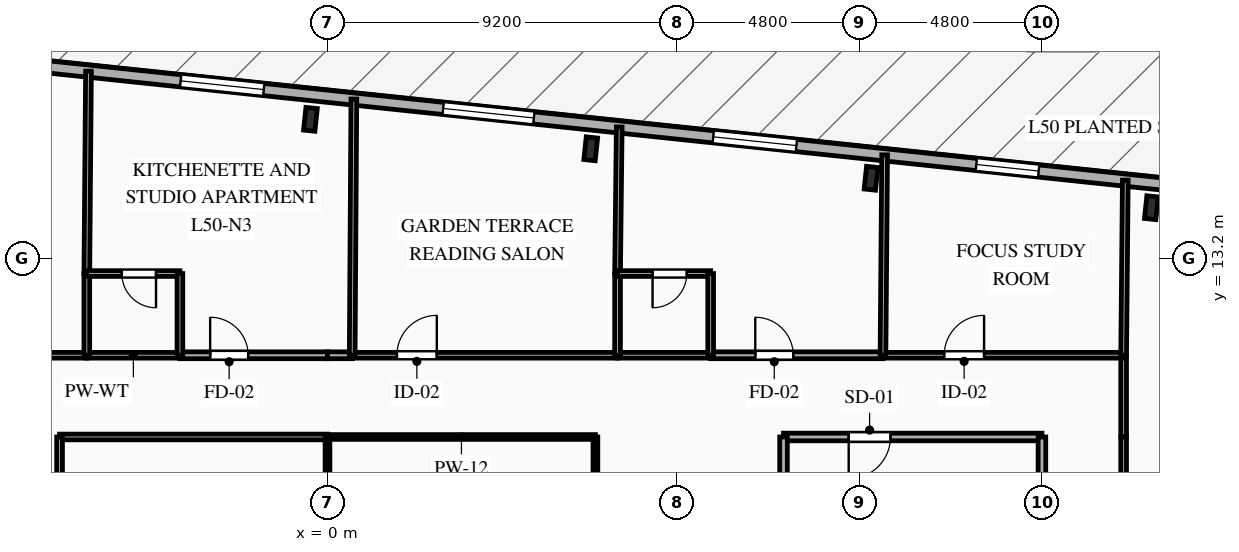
"""IFC4 building model, lengths in metres.
Left out: names, types, materials, properties, quantities, classifications, styles, units other than length and angle.
Written with IfcOpenShell. Run it as: python <this file> out.ifc"""

import sys

from ifc_helpers import new_model, si_unit, direction, frame, frame_2d, origin, origin_2d, place, context, subcontext, project, spatial, rectangle, i_section, extrude, element, fill, save


model = new_model("IFC4")
c1 = context("Model", 3, precision=1e-05, world=origin(), true_north=direction((0.0, 1.0)))
c2 = subcontext(c1, "Body", "Model", "MODEL_VIEW")
j1 = project(units=[si_unit("LENGTHUNIT", "METRE"), si_unit("PLANEANGLEUNIT", "RADIAN")], contexts=[c1])
p1 = place(None, origin())
s1 = spatial("IfcSite", under=j1, at=p1, CompositionType="ELEMENT")
p2 = place(p1, origin())
s2 = spatial("IfcBuilding", under=s1, at=p2, CompositionType="ELEMENT")
p3 = place(p2, frame((0.0, 0.0, 179.65)))
s3 = spatial("IfcBuildingStorey", under=s2, at=p3, CompositionType="ELEMENT", Elevation=179.65)
for number, where, z_axis, x_axis in (
    (1, (21.679, 14.532, 0.0), (0.0, 0.0, 1.0), (0.995, -0.105, 0.0)),
    (2, (14.303, 15.308, 0.0), (0.0, 0.0, 1.0), (0.995, -0.105, 0.0)),
    (3, (6.927, 16.083, 0.0), (0.0, 0.0, 1.0), (0.995, -0.105, 0.0)),
    (4, (-0.449, 16.858, 0.0), (0.0, 0.0, 1.0), (0.995, -0.105, 0.0)),
):
    element("IfcColumn", number, at=place(p3, frame(where, z_axis=z_axis, x_axis=x_axis)), inside=s3, PredefinedType="COLUMN", context=c2, shape_type="SweptSolid", body=[
        extrude(i_section(OverallWidth=0.3, OverallDepth=0.6, WebThickness=0.015, FlangeThickness=0.03, FilletRadius=0.027, at=origin_2d()), origin(), (0.0, 0.0, 1.0), 3.35),
    ])
p4 = place(p3, frame((-23.156, 19.898, 0.0), z_axis=(0.0, 0.0, 1.0), x_axis=(0.994522001802, -0.104527450613, 0.0)))
e5 = element("IfcWall", 5, at=p4, inside=s3, PredefinedType="SOLIDWALL", context=c2, shape_type="SweptSolid", body=[
    extrude(rectangle(XDim=45.8, YDim=0.32, at=frame_2d((22.9, 0.0))), origin(), (0.0, 0.0, 1.0), 3.04),
])
p5 = place(p4, frame((10.65, 0.0, 0.0)))
e6 = element("IfcOpeningElement", 6, at=p5, cuts=e5, PredefinedType="OPENING", context=c2, shape_type="SweptSolid", body=[
    extrude(rectangle(XDim=1.2, YDim=2.2, at=frame_2d((0.6, 1.1))), frame((0.0, 0.17, 0.0), z_axis=(0.0, -1.0, 0.0), x_axis=(1.0, 0.0, 0.0)), (0.0, 0.0, 1.0), 0.34),
])
p6 = place(p4, frame((5.34, 0.0, 0.85)))
e7 = element("IfcOpeningElement", 7, at=p6, cuts=e5, PredefinedType="OPENING", context=c2, shape_type="SweptSolid", body=[
    extrude(rectangle(XDim=1.65, YDim=1.85, at=frame_2d((0.825, 0.925))), frame((0.0, 0.17, 0.0), z_axis=(0.0, -1.0, 0.0), x_axis=(1.0, 0.0, 0.0)), (0.0, 0.0, 1.0), 0.34),
])
p7 = place(p4, frame((12.842, 0.0, 0.85)))
e8 = element("IfcOpeningElement", 8, at=p7, cuts=e5, PredefinedType="OPENING", context=c2, shape_type="SweptSolid", body=[
    extrude(rectangle(XDim=2.4, YDim=1.95, at=frame_2d((1.2, 0.975))), frame((0.0, 0.17, 0.0), z_axis=(0.0, -1.0, 0.0), x_axis=(1.0, 0.0, 0.0)), (0.0, 0.0, 1.0), 0.34),
])
p8 = place(p4, frame((19.398, 0.0, 0.85)))
e9 = element("IfcOpeningElement", 9, at=p8, cuts=e5, PredefinedType="OPENING", context=c2, shape_type="SweptSolid", body=[
    extrude(rectangle(XDim=2.2, YDim=1.85, at=frame_2d((1.1, 0.925))), frame((0.0, 0.17, 0.0), z_axis=(0.0, -1.0, 0.0), x_axis=(1.0, 0.0, 0.0)), (0.0, 0.0, 1.0), 0.34),
])
p9 = place(p4, frame((26.344, 0.0, 0.85)))
e10 = element("IfcOpeningElement", 10, at=p9, cuts=e5, PredefinedType="OPENING", context=c2, shape_type="SweptSolid", body=[
    extrude(rectangle(XDim=2.4, YDim=1.95, at=frame_2d((1.2, 0.975))), frame((0.0, 0.17, 0.0), z_axis=(0.0, -1.0, 0.0), x_axis=(1.0, 0.0, 0.0)), (0.0, 0.0, 1.0), 0.34),
])
p10 = place(p4, frame((33.49, 0.0, 0.85)))
e11 = element("IfcOpeningElement", 11, at=p10, cuts=e5, PredefinedType="OPENING", context=c2, shape_type="SweptSolid", body=[
    extrude(rectangle(XDim=2.2, YDim=1.85, at=frame_2d((1.1, 0.925))), frame((0.0, 0.17, 0.0), z_axis=(0.0, -1.0, 0.0), x_axis=(1.0, 0.0, 0.0)), (0.0, 0.0, 1.0), 0.34),
])
p11 = place(p4, frame((40.451, 0.0, 0.85)))
e12 = element("IfcOpeningElement", 12, at=p11, cuts=e5, PredefinedType="OPENING", context=c2, shape_type="SweptSolid", body=[
    extrude(rectangle(XDim=1.65, YDim=1.85, at=frame_2d((0.825, 0.925))), frame((0.0, 0.17, 0.0), z_axis=(0.0, -1.0, 0.0), x_axis=(1.0, 0.0, 0.0)), (0.0, 0.0, 1.0), 0.34),
])
p12 = place(p3, frame((18.8, 8.5, 0.0), z_axis=(0.0, 0.0, 1.0), x_axis=(-1.0, 0.0, 0.0)))
e13 = element("IfcWall", 13, at=p12, inside=s3, PredefinedType="PARTITIONING", context=c2, shape_type="SweptSolid", body=[
    extrude(rectangle(XDim=6.8, YDim=0.2, at=frame_2d((3.4, 0.0))), origin(), (0.0, 0.0, 1.0), 3.04),
])
p13 = place(p12, frame((3.985, 0.0, 0.0)))
e14 = element("IfcOpeningElement", 14, at=p13, cuts=e13, PredefinedType="OPENING", context=c2, shape_type="SweptSolid", body=[
    extrude(rectangle(XDim=1.1, YDim=2.15, at=frame_2d((0.55, 1.075))), frame((0.0, 0.11, 0.0), z_axis=(0.0, -1.0, 0.0), x_axis=(1.0, 0.0, 0.0)), (0.0, 0.0, 1.0), 0.22),
])
p14 = place(p3, frame((18.8, 5.6, 0.0), z_axis=(0.0, 0.0, 1.0), x_axis=(0.0, 1.0, 0.0)))
e15 = element("IfcWall", 15, at=p14, inside=s3, PredefinedType="PARTITIONING", context=c2, shape_type="SweptSolid", body=[
    extrude(rectangle(XDim=2.9, YDim=0.2, at=frame_2d((1.45, 0.0))), origin(), (0.0, 0.0, 1.0), 2.665),
])
p15 = place(p3, frame((12.0, 8.5, 0.0), z_axis=(0.0, 0.0, 1.0), x_axis=(0.0, -1.0, 0.0)))
e16 = element("IfcWall", 16, at=p15, inside=s3, PredefinedType="PARTITIONING", context=c2, shape_type="SweptSolid", body=[
    extrude(rectangle(XDim=2.9, YDim=0.2, at=frame_2d((1.45, 0.0))), origin(), (0.0, 0.0, 1.0), 3.04),
])
p16 = place(p3, frame((-13.317, 10.65, 0.0), z_axis=(0.0, 0.0, 1.0), x_axis=(1.0, 0.0, 0.0)))
e17 = element("IfcWall", 17, at=p16, inside=s3, PredefinedType="PARTITIONING", context=c2, shape_type="SweptSolid", body=[
    extrude(rectangle(XDim=6.984, YDim=0.15, at=frame_2d((3.492, 0.0))), origin(), (0.0, 0.0, 1.0), 3.04),
])
p17 = place(p16, frame((1.177, 0.0, 0.0)))
e18 = element("IfcOpeningElement", 18, at=p17, cuts=e17, PredefinedType="OPENING", context=c2, shape_type="SweptSolid", body=[
    extrude(rectangle(XDim=1.05, YDim=2.15, at=frame_2d((0.525, 1.075))), frame((0.0, 0.085, 0.0), z_axis=(0.0, -1.0, 0.0), x_axis=(1.0, 0.0, 0.0)), (0.0, 0.0, 1.0), 0.17),
])
p18 = place(p3, frame((-3.883, 10.65, 0.0), z_axis=(0.0, 0.0, 1.0), x_axis=(1.0, 0.0, 0.0)))
e19 = element("IfcWall", 19, at=p18, inside=s3, PredefinedType="PARTITIONING", context=c2, shape_type="SweptSolid", body=[
    extrude(rectangle(XDim=3.883, YDim=0.18, at=frame_2d((1.941, 0.0))), origin(), (0.0, 0.0, 1.0), 3.04),
])
p19 = place(p18, frame((0.795, 0.0, 0.0)))
e20 = element("IfcOpeningElement", 20, at=p19, cuts=e19, PredefinedType="OPENING", context=c2, shape_type="SweptSolid", body=[
    extrude(rectangle(XDim=1.0, YDim=2.15, at=frame_2d((0.5, 1.075))), frame((0.0, 0.1, 0.0), z_axis=(0.0, -1.0, 0.0), x_axis=(1.0, 0.0, 0.0)), (0.0, 0.0, 1.0), 0.2),
])
p20 = place(p3, frame((-6.333, 10.65, 0.0), z_axis=(0.0, 0.0, 1.0), x_axis=(1.0, 0.0, 0.0)))
e21 = element("IfcWall", 21, at=p20, inside=s3, PredefinedType="PLUMBINGWALL", context=c2, shape_type="SweptSolid", body=[
    extrude(rectangle(XDim=2.45, YDim=0.15, at=frame_2d((1.225, 0.0))), origin(), (0.0, 0.0, 1.0), 3.04),
])
p21 = place(p3, frame((0.0, 8.5, 0.0), z_axis=(0.0, 0.0, 1.0), x_axis=(-1.0, 0.0, 0.0)))
e22 = element("IfcWall", 22, at=p21, inside=s3, PredefinedType="PARTITIONING", context=c2, shape_type="SweptSolid", body=[
    extrude(rectangle(XDim=7.05, YDim=0.15, at=frame_2d((3.525, 0.0))), origin(), (0.0, 0.0, 1.0), 3.04),
])
p22 = place(p3, frame((20.95, 10.65, 0.0), z_axis=(0.0, 0.0, 1.0), x_axis=(0.0, -1.0, 0.0)))
e23 = element("IfcWall", 23, at=p22, inside=s3, PredefinedType="PARTITIONING", context=c2, shape_type="SweptSolid", body=[
    extrude(rectangle(XDim=2.15, YDim=0.15, at=frame_2d((1.075, 0.0))), origin(), (0.0, 0.0, 1.0), 3.04),
])
p23 = place(p3, frame((0.0, 10.65, 0.0), z_axis=(0.0, 0.0, 1.0), x_axis=(1.0, 0.0, 0.0)))
e24 = element("IfcWall", 24, at=p23, inside=s3, PredefinedType="PARTITIONING", context=c2, shape_type="SweptSolid", body=[
    extrude(rectangle(XDim=0.65, YDim=0.18, at=frame_2d((0.325, 0.0))), origin(), (0.0, 0.0, 1.0), 3.04),
])
p24 = place(p3, frame((0.65, 10.65, 0.0), z_axis=(0.0, 0.0, 1.0), x_axis=(1.0, 0.0, 0.0)))
e25 = element("IfcWall", 25, at=p24, inside=s3, PredefinedType="PARTITIONING", context=c2, shape_type="SweptSolid", body=[
    extrude(rectangle(XDim=6.983, YDim=0.15, at=frame_2d((3.492, 0.0))), origin(), (0.0, 0.0, 1.0), 3.04),
])
p25 = place(p24, frame((1.177, 0.0, 0.0)))
e26 = element("IfcOpeningElement", 26, at=p25, cuts=e25, PredefinedType="OPENING", context=c2, shape_type="SweptSolid", body=[
    extrude(rectangle(XDim=1.05, YDim=2.15, at=frame_2d((0.525, 1.075))), frame((0.0, 0.085, 0.0), z_axis=(0.0, -1.0, 0.0), x_axis=(1.0, 0.0, 0.0)), (0.0, 0.0, 1.0), 0.17),
])
p26 = place(p3, frame((10.083, 10.65, 0.0), z_axis=(0.0, 0.0, 1.0), x_axis=(1.0, 0.0, 0.0)))
e27 = element("IfcWall", 27, at=p26, inside=s3, PredefinedType="PARTITIONING", context=c2, shape_type="SweptSolid", body=[
    extrude(rectangle(XDim=4.534, YDim=0.18, at=frame_2d((2.267, 0.0))), origin(), (0.0, 0.0, 1.0), 3.04),
])
p27 = place(p26, frame((1.174, 0.0, 0.0)))
e28 = element("IfcOpeningElement", 28, at=p27, cuts=e27, PredefinedType="OPENING", context=c2, shape_type="SweptSolid", body=[
    extrude(rectangle(XDim=1.0, YDim=2.15, at=frame_2d((0.5, 1.075))), frame((0.0, 0.1, 0.0), z_axis=(0.0, -1.0, 0.0), x_axis=(1.0, 0.0, 0.0)), (0.0, 0.0, 1.0), 0.2),
])
p28 = place(p3, frame((7.633, 10.65, 0.0), z_axis=(0.0, 0.0, 1.0), x_axis=(1.0, 0.0, 0.0)))
e29 = element("IfcWall", 29, at=p28, inside=s3, PredefinedType="PLUMBINGWALL", context=c2, shape_type="SweptSolid", body=[
    extrude(rectangle(XDim=2.45, YDim=0.15, at=frame_2d((1.225, 0.0))), origin(), (0.0, 0.0, 1.0), 3.04),
])
p29 = place(p3, frame((14.617, 10.65, 0.0), z_axis=(0.0, 0.0, 1.0), x_axis=(1.0, 0.0, 0.0)))
e30 = element("IfcWall", 30, at=p29, inside=s3, PredefinedType="PARTITIONING", context=c2, shape_type="SweptSolid", body=[
    extrude(rectangle(XDim=6.333, YDim=0.15, at=frame_2d((3.167, 0.0))), origin(), (0.0, 0.0, 1.0), 3.04),
])
p30 = place(p29, frame((1.611, 0.0, 0.0)))
e31 = element("IfcOpeningElement", 31, at=p30, cuts=e30, PredefinedType="OPENING", context=c2, shape_type="SweptSolid", body=[
    extrude(rectangle(XDim=1.05, YDim=2.15, at=frame_2d((0.525, 1.075))), frame((0.0, 0.085, 0.0), z_axis=(0.0, -1.0, 0.0), x_axis=(1.0, 0.0, 0.0)), (0.0, 0.0, 1.0), 0.17),
])
p31 = place(p3, frame((7.05, 8.5, 0.0), z_axis=(0.0, 0.0, 1.0), x_axis=(-1.0, 0.0, 0.0)))
e32 = element("IfcWall", 32, at=p31, inside=s3, PredefinedType="PARTITIONING", context=c2, shape_type="SweptSolid", body=[
    extrude(rectangle(XDim=7.05, YDim=0.125, at=frame_2d((3.525, 0.0))), origin(), (0.0, 0.0, 1.0), 3.04),
])
p32 = place(p3, frame((20.95, 8.5, 0.0), z_axis=(0.0, 0.0, 1.0), x_axis=(0.0, -1.0, 0.0)))
e33 = element("IfcWall", 33, at=p32, inside=s3, PredefinedType="PARTITIONING", context=c2, shape_type="SweptSolid", body=[
    extrude(rectangle(XDim=9.263, YDim=0.15, at=frame_2d((4.632, 0.0))), origin(), (0.0, 0.0, 1.0), 2.695),
])
p33 = place(p32, frame((6.751, 0.0, 0.0)))
e34 = element("IfcOpeningElement", 34, at=p33, cuts=e33, PredefinedType="OPENING", context=c2, shape_type="SweptSolid", body=[
    extrude(rectangle(XDim=1.05, YDim=2.15, at=frame_2d((0.525, 1.075))), frame((0.0, 0.085, 0.0), z_axis=(0.0, -1.0, 0.0), x_axis=(1.0, 0.0, 0.0)), (0.0, 0.0, 1.0), 0.17),
])
p34 = place(p3, frame((-7.05, 8.5, 0.0), z_axis=(0.0, 0.0, 1.0), x_axis=(0.0, -1.0, 0.0)))
e35 = element("IfcWall", 35, at=p34, inside=s3, PredefinedType="PARTITIONING", context=c2, shape_type="SweptSolid", body=[
    extrude(rectangle(XDim=9.3, YDim=0.15, at=frame_2d((4.65, 0.0))), origin(), (0.0, 0.0, 1.0), 3.04),
])
p35 = place(p34, frame((6.784, 0.0, 0.0)))
e36 = element("IfcOpeningElement", 36, at=p35, cuts=e35, PredefinedType="OPENING", context=c2, shape_type="SweptSolid", body=[
    extrude(rectangle(XDim=1.05, YDim=2.15, at=frame_2d((0.525, 1.075))), frame((0.0, 0.085, 0.0), z_axis=(0.0, -1.0, 0.0), x_axis=(1.0, 0.0, 0.0)), (0.0, 0.0, 1.0), 0.17),
])
p36 = place(p3, frame((7.05, -0.8, 0.0), z_axis=(0.0, 0.0, 1.0), x_axis=(0.0, 1.0, 0.0)))
e37 = element("IfcWall", 37, at=p36, inside=s3, PredefinedType="PARTITIONING", context=c2, shape_type="SweptSolid", body=[
    extrude(rectangle(XDim=9.3, YDim=0.125, at=frame_2d((4.65, 0.0))), origin(), (0.0, 0.0, 1.0), 3.04),
])
p37 = place(p36, frame((1.479, 0.0, 0.0)))
e38 = element("IfcOpeningElement", 38, at=p37, cuts=e37, PredefinedType="OPENING", context=c2, shape_type="SweptSolid", body=[
    extrude(rectangle(XDim=0.95, YDim=2.1, at=frame_2d((0.475, 1.05))), frame((0.0, 0.073, 0.0), z_axis=(0.0, -1.0, 0.0), x_axis=(1.0, 0.0, 0.0)), (0.0, 0.0, 1.0), 0.145),
])
p38 = place(p3, frame((20.95, 10.65, 0.0), z_axis=(0.0, 0.0, 1.0), x_axis=(0.009535990233, 0.999954531411, 0.0)))
e39 = element("IfcWall", 39, at=p38, inside=s3, PredefinedType="PARTITIONING", context=c2, shape_type="SweptSolid", body=[
    extrude(rectangle(XDim=4.608, YDim=0.15, at=frame_2d((2.304, 0.0))), origin(), (0.0, 0.0, 1.0), 2.665),
])
p39 = place(p3, frame((-6.289, 18.125, 0.0), z_axis=(0.0, 0.0, 1.0), x_axis=(-0.008251678897, -0.999965954318, 0.0)))
e40 = element("IfcWall", 40, at=p39, inside=s3, PredefinedType="PARTITIONING", context=c2, shape_type="SweptSolid", body=[
    extrude(rectangle(XDim=5.326, YDim=0.15, at=frame_2d((2.663, 0.0))), origin(), (0.0, 0.0, 1.0), 3.04),
])
p40 = place(p3, frame((-6.333, 12.8, 0.0), z_axis=(0.0, 0.0, 1.0), x_axis=(0.0, -1.0, 0.0)))
e41 = element("IfcWall", 41, at=p40, inside=s3, PredefinedType="PLUMBINGWALL", context=c2, shape_type="SweptSolid", body=[
    extrude(rectangle(XDim=2.15, YDim=0.15, at=frame_2d((1.075, 0.0))), origin(), (0.0, 0.0, 1.0), 3.04),
])
p41 = place(p3, frame((-3.883, 12.8, 0.0), z_axis=(0.0, 0.0, 1.0), x_axis=(-1.0, 0.0, 0.0)))
e42 = element("IfcWall", 42, at=p41, inside=s3, PredefinedType="PLUMBINGWALL", context=c2, shape_type="SweptSolid", body=[
    extrude(rectangle(XDim=2.45, YDim=0.15, at=frame_2d((1.225, 0.0))), origin(), (0.0, 0.0, 1.0), 3.04),
])
p42 = place(p41, frame((0.629, 0.0, 0.0)))
e43 = element("IfcOpeningElement", 43, at=p42, cuts=e42, PredefinedType="OPENING", context=c2, shape_type="SweptSolid", body=[
    extrude(rectangle(XDim=0.9, YDim=2.1, at=frame_2d((0.45, 1.05))), frame((0.0, 0.085, 0.0), z_axis=(0.0, -1.0, 0.0), x_axis=(1.0, 0.0, 0.0)), (0.0, 0.0, 1.0), 0.17),
])
p43 = place(p3, frame((-3.883, 10.65, 0.0), z_axis=(0.0, 0.0, 1.0), x_axis=(0.0, 1.0, 0.0)))
e44 = element("IfcWall", 44, at=p43, inside=s3, PredefinedType="PLUMBINGWALL", context=c2, shape_type="SweptSolid", body=[
    extrude(rectangle(XDim=2.15, YDim=0.15, at=frame_2d((1.075, 0.0))), origin(), (0.0, 0.0, 1.0), 3.04),
])
p44 = place(p3, frame((0.694, 17.392, 0.0), z_axis=(0.0, 0.0, 1.0), x_axis=(-0.0065182942, -0.999978755695, 0.0)))
e45 = element("IfcWall", 45, at=p44, inside=s3, PredefinedType="PARTITIONING", context=c2, shape_type="SweptSolid", body=[
    extrude(rectangle(XDim=6.742, YDim=0.15, at=frame_2d((3.371, 0.0))), origin(), (0.0, 0.0, 1.0), 3.04),
])
p45 = place(p3, frame((7.677, 16.658, 0.0), z_axis=(0.0, 0.0, 1.0), x_axis=(-0.01139094499, -0.999935121081, 0.0)))
e46 = element("IfcWall", 46, at=p45, inside=s3, PredefinedType="PARTITIONING", context=c2, shape_type="SweptSolid", body=[
    extrude(rectangle(XDim=3.858, YDim=0.15, at=frame_2d((1.929, 0.0))), origin(), (0.0, 0.0, 1.0), 2.665),
])
p46 = place(p3, frame((7.633, 12.8, 0.0), z_axis=(0.0, 0.0, 1.0), x_axis=(0.0, -1.0, 0.0)))
e47 = element("IfcWall", 47, at=p46, inside=s3, PredefinedType="PLUMBINGWALL", context=c2, shape_type="SweptSolid", body=[
    extrude(rectangle(XDim=2.15, YDim=0.15, at=frame_2d((1.075, 0.0))), origin(), (0.0, 0.0, 1.0), 2.665),
])
p47 = place(p3, frame((10.083, 12.8, 0.0), z_axis=(0.0, 0.0, 1.0), x_axis=(-1.0, 0.0, 0.0)))
e48 = element("IfcWall", 48, at=p47, inside=s3, PredefinedType="PLUMBINGWALL", context=c2, shape_type="SweptSolid", body=[
    extrude(rectangle(XDim=2.45, YDim=0.15, at=frame_2d((1.225, 0.0))), origin(), (0.0, 0.0, 1.0), 3.04),
])
p48 = place(p47, frame((0.629, 0.0, 0.0)))
e49 = element("IfcOpeningElement", 49, at=p48, cuts=e48, PredefinedType="OPENING", context=c2, shape_type="SweptSolid", body=[
    extrude(rectangle(XDim=0.9, YDim=2.1, at=frame_2d((0.45, 1.05))), frame((0.0, 0.085, 0.0), z_axis=(0.0, -1.0, 0.0), x_axis=(1.0, 0.0, 0.0)), (0.0, 0.0, 1.0), 0.17),
])
p49 = place(p3, frame((10.083, 10.65, 0.0), z_axis=(0.0, 0.0, 1.0), x_axis=(0.0, 1.0, 0.0)))
e50 = element("IfcWall", 50, at=p49, inside=s3, PredefinedType="PLUMBINGWALL", context=c2, shape_type="SweptSolid", body=[
    extrude(rectangle(XDim=2.15, YDim=0.15, at=frame_2d((1.075, 0.0))), origin(), (0.0, 0.0, 1.0), 3.04),
])
p50 = place(p3, frame((14.661, 15.924, 0.0), z_axis=(0.0, 0.0, 1.0), x_axis=(-0.008332658252, -0.999965282801, 0.0)))
e51 = element("IfcWall", 51, at=p50, inside=s3, PredefinedType="PARTITIONING", context=c2, shape_type="SweptSolid", body=[
    extrude(rectangle(XDim=5.274, YDim=0.15, at=frame_2d((2.637, 0.0))), origin(), (0.0, 0.0, 1.0), 3.04),
])
p51 = place(p3, frame((0.0, 8.5, 0.0), z_axis=(0.0, 0.0, 1.0), x_axis=(0.0, -1.0, 0.0)))
e52 = element("IfcWall", 52, at=p51, inside=s3, PredefinedType="PARTITIONING", context=c2, shape_type="SweptSolid", body=[
    extrude(rectangle(XDim=9.3, YDim=0.125, at=frame_2d((4.65, 0.0))), origin(), (0.0, 0.0, 1.0), 3.04),
])
p52 = place(p8, origin())
e53 = element("IfcWindow", 53, at=p52, inside=s3, PartitioningType="SINGLE_PANEL", PredefinedType="WINDOW", context=c2, shape_type="SweptSolid", body=[
    extrude(rectangle(XDim=2.2, YDim=1.85, at=frame_2d((1.1, 0.925))), frame((0.0, 0.03, 0.0), z_axis=(0.0, -1.0, 0.0), x_axis=(1.0, 0.0, 0.0)), (0.0, 0.0, 1.0), 0.06),
])
fill(e9, e53)
p53 = place(p9, origin())
e54 = element("IfcWindow", 54, at=p53, inside=s3, PartitioningType="SINGLE_PANEL", PredefinedType="WINDOW", context=c2, shape_type="SweptSolid", body=[
    extrude(rectangle(XDim=2.4, YDim=1.95, at=frame_2d((1.2, 0.975))), frame((0.0, 0.03, 0.0), z_axis=(0.0, -1.0, 0.0), x_axis=(1.0, 0.0, 0.0)), (0.0, 0.0, 1.0), 0.06),
])
fill(e10, e54)
p54 = place(p10, origin())
e55 = element("IfcWindow", 55, at=p54, inside=s3, PartitioningType="SINGLE_PANEL", PredefinedType="WINDOW", context=c2, shape_type="SweptSolid", body=[
    extrude(rectangle(XDim=2.2, YDim=1.85, at=frame_2d((1.1, 0.925))), frame((0.0, 0.03, 0.0), z_axis=(0.0, -1.0, 0.0), x_axis=(1.0, 0.0, 0.0)), (0.0, 0.0, 1.0), 0.06),
])
fill(e11, e55)
p55 = place(p11, origin())
e56 = element("IfcWindow", 56, at=p55, inside=s3, PartitioningType="SINGLE_PANEL", PredefinedType="WINDOW", context=c2, shape_type="SweptSolid", body=[
    extrude(rectangle(XDim=1.65, YDim=1.85, at=frame_2d((0.825, 0.925))), frame((0.0, 0.03, 0.0), z_axis=(0.0, -1.0, 0.0), x_axis=(1.0, 0.0, 0.0)), (0.0, 0.0, 1.0), 0.06),
])
fill(e12, e56)
p56 = place(p13, origin())
e57 = element("IfcDoor", 57, at=p56, inside=s3, OperationType="SINGLE_SWING_RIGHT", PredefinedType="DOOR", context=c2, shape_type="SweptSolid", body=[
    extrude(rectangle(XDim=1.1, YDim=2.15, at=frame_2d((0.55, 1.075))), frame((0.0, 0.025, 0.0), z_axis=(0.0, -1.0, 0.0), x_axis=(1.0, 0.0, 0.0)), (0.0, 0.0, 1.0), 0.05),
])
fill(e14, e57)
p57 = place(p19, origin())
e58 = element("IfcDoor", 58, at=p57, inside=s3, OperationType="SINGLE_SWING_LEFT", PredefinedType="DOOR", context=c2, shape_type="SweptSolid", body=[
    extrude(rectangle(XDim=1.0, YDim=2.15, at=frame_2d((0.5, 1.075))), frame((0.0, 0.025, 0.0), z_axis=(0.0, -1.0, 0.0), x_axis=(1.0, 0.0, 0.0)), (0.0, 0.0, 1.0), 0.05),
])
fill(e20, e58)
p58 = place(p25, origin())
e59 = element("IfcDoor", 59, at=p58, inside=s3, OperationType="SINGLE_SWING_RIGHT", PredefinedType="DOOR", context=c2, shape_type="SweptSolid", body=[
    extrude(rectangle(XDim=1.05, YDim=2.15, at=frame_2d((0.525, 1.075))), frame((0.0, 0.025, 0.0), z_axis=(0.0, -1.0, 0.0), x_axis=(1.0, 0.0, 0.0)), (0.0, 0.0, 1.0), 0.05),
])
fill(e26, e59)
p59 = place(p27, origin())
e60 = element("IfcDoor", 60, at=p59, inside=s3, OperationType="SINGLE_SWING_LEFT", PredefinedType="DOOR", context=c2, shape_type="SweptSolid", body=[
    extrude(rectangle(XDim=1.0, YDim=2.15, at=frame_2d((0.5, 1.075))), frame((0.0, 0.025, 0.0), z_axis=(0.0, -1.0, 0.0), x_axis=(1.0, 0.0, 0.0)), (0.0, 0.0, 1.0), 0.05),
])
fill(e28, e60)
p60 = place(p30, origin())
e61 = element("IfcDoor", 61, at=p60, inside=s3, OperationType="SINGLE_SWING_RIGHT", PredefinedType="DOOR", context=c2, shape_type="SweptSolid", body=[
    extrude(rectangle(XDim=1.05, YDim=2.15, at=frame_2d((0.525, 1.075))), frame((0.0, 0.025, 0.0), z_axis=(0.0, -1.0, 0.0), x_axis=(1.0, 0.0, 0.0)), (0.0, 0.0, 1.0), 0.05),
])
fill(e31, e61)
p61 = place(p42, origin())
e62 = element("IfcDoor", 62, at=p61, inside=s3, OperationType="SINGLE_SWING_LEFT", PredefinedType="DOOR", context=c2, shape_type="SweptSolid", body=[
    extrude(rectangle(XDim=0.9, YDim=2.1, at=frame_2d((0.45, 1.05))), frame((0.0, 0.025, 0.0), z_axis=(0.0, -1.0, 0.0), x_axis=(1.0, 0.0, 0.0)), (0.0, 0.0, 1.0), 0.05),
])
fill(e43, e62)
p62 = place(p48, origin())
e63 = element("IfcDoor", 63, at=p62, inside=s3, OperationType="SINGLE_SWING_RIGHT", PredefinedType="DOOR", context=c2, shape_type="SweptSolid", body=[
    extrude(rectangle(XDim=0.9, YDim=2.1, at=frame_2d((0.45, 1.05))), frame((0.0, 0.025, 0.0), z_axis=(0.0, -1.0, 0.0), x_axis=(1.0, 0.0, 0.0)), (0.0, 0.0, 1.0), 0.05),
])
fill(e49, e63)
save(model, sys.argv[1])
